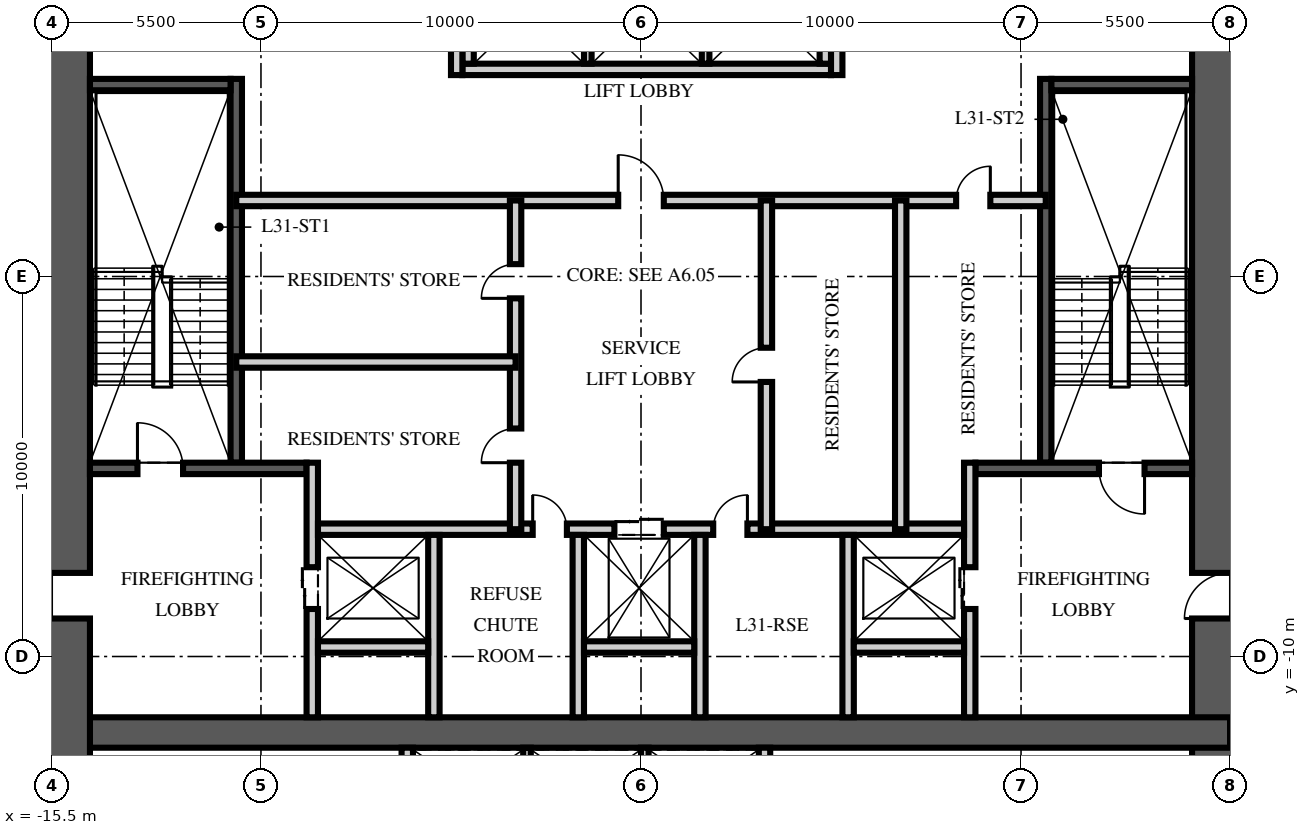
"""IFC4 building model, lengths in metres.
Left out: names, types, materials, properties, quantities, classifications, styles, units other than length and angle.
Written with IfcOpenShell. Run it as: python <this file> out.ifc"""

import sys

from ifc_helpers import new_model, si_unit, direction, frame, frame_2d, origin, place, context, subcontext, project, spatial, rectangle, extrude, element, fill, save


model = new_model("IFC4")
c1 = context("Model", 3, precision=1e-05, world=origin(), true_north=direction((0.0, 1.0)))
c2 = subcontext(c1, "Body", "Model", "MODEL_VIEW")
j1 = project(units=[si_unit("LENGTHUNIT", "METRE"), si_unit("PLANEANGLEUNIT", "RADIAN")], contexts=[c1])
p1 = place(None, origin())
s1 = spatial("IfcSite", under=j1, at=p1, CompositionType="ELEMENT")
p2 = place(p1, origin())
s2 = spatial("IfcBuilding", under=s1, at=p2, CompositionType="ELEMENT")
p3 = place(p2, frame((0.0, 0.0, 126.0)))
s3 = spatial("IfcBuildingStorey", under=s2, at=p3, CompositionType="ELEMENT", Elevation=126.0)
p4 = place(p3, frame((15.5, -15.5, -0.25), z_axis=(0.0, 0.0, 1.0), x_axis=(0.0, 1.0, 0.0)))
e1 = element("IfcWall", 1, at=p4, inside=s3, PredefinedType="SHEAR", context=c2, shape_type="SweptSolid", body=[
    extrude(rectangle(XDim=31.0, YDim=2.0, at=frame_2d((15.5, 0.0))), origin(), (0.0, 0.0, 1.0), 3.75),
])
p5 = place(p4, frame((6.5, 0.0, 0.25)))
e2 = element("IfcOpeningElement", 2, at=p5, cuts=e1, PredefinedType="OPENING", context=c2, shape_type="SweptSolid", body=[
    extrude(rectangle(XDim=1.2, YDim=2.1, at=frame_2d((0.6, 1.05))), frame((0.0, 1.01, 0.0), z_axis=(0.0, -1.0, 0.0), x_axis=(1.0, 0.0, 0.0)), (0.0, 0.0, 1.0), 2.02),
])
p6 = place(p4, frame((23.0, 0.0, 0.25)))
e3 = element("IfcOpeningElement", 3, at=p6, cuts=e1, PredefinedType="OPENING", context=c2, shape_type="SweptSolid", body=[
    extrude(rectangle(XDim=1.8, YDim=2.1, at=frame_2d((0.9, 1.05))), frame((0.0, 1.01, 0.0), z_axis=(0.0, -1.0, 0.0), x_axis=(1.0, 0.0, 0.0)), (0.0, 0.0, 1.0), 2.02),
])
p7 = place(p3, frame((-15.5, -12.0, -0.25), z_axis=(0.0, 0.0, 1.0), x_axis=(1.0, 0.0, 0.0)))
e4 = element("IfcWall", 4, at=p7, inside=s3, PredefinedType="SHEAR", context=c2, shape_type="SweptSolid", body=[
    extrude(rectangle(XDim=31.0, YDim=0.8, at=frame_2d((15.5, 0.0))), origin(), (0.0, 0.0, 1.0), 3.75),
])
p8 = place(p3, frame((-15.5, -15.5, -0.25), z_axis=(0.0, 0.0, 1.0), x_axis=(0.0, 1.0, 0.0)))
e5 = element("IfcWall", 5, at=p8, inside=s3, PredefinedType="SHEAR", context=c2, shape_type="SweptSolid", body=[
    extrude(rectangle(XDim=31.0, YDim=2.0, at=frame_2d((15.5, 0.0))), origin(), (0.0, 0.0, 1.0), 3.75),
])
p9 = place(p8, frame((6.5, 0.0, 0.25)))
e6 = element("IfcOpeningElement", 6, at=p9, cuts=e5, PredefinedType="OPENING", context=c2, shape_type="SweptSolid", body=[
    extrude(rectangle(XDim=1.2, YDim=2.1, at=frame_2d((0.6, 1.05))), frame((0.0, 1.01, 0.0), z_axis=(0.0, -1.0, 0.0), x_axis=(1.0, 0.0, 0.0)), (0.0, 0.0, 1.0), 2.02),
])
p10 = place(p8, frame((23.0, 0.0, 0.25)))
e7 = element("IfcOpeningElement", 7, at=p10, cuts=e5, PredefinedType="OPENING", context=c2, shape_type="SweptSolid", body=[
    extrude(rectangle(XDim=1.8, YDim=2.1, at=frame_2d((0.9, 1.05))), frame((0.0, 1.01, 0.0), z_axis=(0.0, -1.0, 0.0), x_axis=(1.0, 0.0, 0.0)), (0.0, 0.0, 1.0), 2.02),
])
p11 = place(p3, frame((-10.65, -4.9, 0.0), z_axis=(0.0, 0.0, 1.0), x_axis=(0.0, 1.0, 0.0)))
e8 = element("IfcWall", 8, at=p11, inside=s3, PredefinedType="SOLIDWALL", context=c2, shape_type="SweptSolid", body=[
    extrude(rectangle(XDim=10.1, YDim=0.3, at=frame_2d((5.05, 0.0))), origin(), (0.0, 0.0, 1.0), 3.5),
])
p12 = place(p3, frame((-14.5, -5.05, 0.0), z_axis=(0.0, 0.0, 1.0), x_axis=(1.0, 0.0, 0.0)))
e9 = element("IfcWall", 9, at=p12, inside=s3, PredefinedType="SOLIDWALL", context=c2, shape_type="SweptSolid", body=[
    extrude(rectangle(XDim=5.7, YDim=0.3, at=frame_2d((2.85, 0.0))), origin(), (0.0, 0.0, 1.0), 3.5),
])
p13 = place(p12, frame((1.25, 0.0, 0.0)))
e10 = element("IfcOpeningElement", 10, at=p13, cuts=e9, PredefinedType="OPENING", context=c2, shape_type="SweptSolid", body=[
    extrude(rectangle(XDim=1.2, YDim=2.1, at=frame_2d((0.6, 1.05))), frame((0.0, 0.16, 0.0), z_axis=(0.0, -1.0, 0.0), x_axis=(1.0, 0.0, 0.0)), (0.0, 0.0, 1.0), 0.32),
])
p14 = place(p3, frame((-14.5, 5.05, 0.0), z_axis=(0.0, 0.0, 1.0), x_axis=(1.0, 0.0, 0.0)))
e11 = element("IfcWall", 11, at=p14, inside=s3, PredefinedType="SOLIDWALL", context=c2, shape_type="SweptSolid", body=[
    extrude(rectangle(XDim=3.7, YDim=0.3, at=frame_2d((1.85, 0.0))), origin(), (0.0, 0.0, 1.0), 3.5),
])
p15 = place(p3, frame((-8.65, -11.6, 0.0), z_axis=(0.0, 0.0, 1.0), x_axis=(0.0, 1.0, 0.0)))
e12 = element("IfcWall", 12, at=p15, inside=s3, PredefinedType="PARTITIONING", context=c2, shape_type="SweptSolid", body=[
    extrude(rectangle(XDim=6.7, YDim=0.3, at=frame_2d((3.35, 0.0))), origin(), (0.0, 0.0, 1.0), 3.5),
])
p16 = place(p15, frame((2.85, 0.0, 0.0)))
e13 = element("IfcOpeningElement", 13, at=p16, cuts=e12, PredefinedType="OPENING", context=c2, shape_type="SweptSolid", body=[
    extrude(rectangle(XDim=1.1, YDim=2.1, at=frame_2d((0.55, 1.05))), frame((0.0, 0.16, 0.0), z_axis=(0.0, -1.0, 0.0), x_axis=(1.0, 0.0, 0.0)), (0.0, 0.0, 1.0), 0.32),
])
p17 = place(p3, frame((10.65, -4.9, 0.0), z_axis=(0.0, 0.0, 1.0), x_axis=(0.0, 1.0, 0.0)))
e14 = element("IfcWall", 14, at=p17, inside=s3, PredefinedType="SOLIDWALL", context=c2, shape_type="SweptSolid", body=[
    extrude(rectangle(XDim=10.1, YDim=0.3, at=frame_2d((5.05, 0.0))), origin(), (0.0, 0.0, 1.0), 3.5),
])
p18 = place(p3, frame((14.5, -5.05, 0.0), z_axis=(0.0, 0.0, 1.0), x_axis=(-1.0, 0.0, 0.0)))
e15 = element("IfcWall", 15, at=p18, inside=s3, PredefinedType="SOLIDWALL", context=c2, shape_type="SweptSolid", body=[
    extrude(rectangle(XDim=5.7, YDim=0.3, at=frame_2d((2.85, 0.0))), origin(), (0.0, 0.0, 1.0), 3.5),
])
p19 = place(p18, frame((1.25, 0.0, 0.0)))
e16 = element("IfcOpeningElement", 16, at=p19, cuts=e15, PredefinedType="OPENING", context=c2, shape_type="SweptSolid", body=[
    extrude(rectangle(XDim=1.2, YDim=2.1, at=frame_2d((0.6, 1.05))), frame((0.0, 0.16, 0.0), z_axis=(0.0, -1.0, 0.0), x_axis=(1.0, 0.0, 0.0)), (0.0, 0.0, 1.0), 0.32),
])
p20 = place(p3, frame((14.5, 5.05, 0.0), z_axis=(0.0, 0.0, 1.0), x_axis=(-1.0, 0.0, 0.0)))
e17 = element("IfcWall", 17, at=p20, inside=s3, PredefinedType="SOLIDWALL", context=c2, shape_type="SweptSolid", body=[
    extrude(rectangle(XDim=3.7, YDim=0.3, at=frame_2d((1.85, 0.0))), origin(), (0.0, 0.0, 1.0), 3.5),
])
p21 = place(p3, frame((8.65, -11.6, 0.0), z_axis=(0.0, 0.0, 1.0), x_axis=(0.0, 1.0, 0.0)))
e18 = element("IfcWall", 18, at=p21, inside=s3, PredefinedType="PARTITIONING", context=c2, shape_type="SweptSolid", body=[
    extrude(rectangle(XDim=6.7, YDim=0.3, at=frame_2d((3.35, 0.0))), origin(), (0.0, 0.0, 1.0), 3.5),
])
p22 = place(p21, frame((2.85, 0.0, 0.0)))
e19 = element("IfcOpeningElement", 19, at=p22, cuts=e18, PredefinedType="OPENING", context=c2, shape_type="SweptSolid", body=[
    extrude(rectangle(XDim=1.1, YDim=2.1, at=frame_2d((0.55, 1.05))), frame((0.0, 0.16, 0.0), z_axis=(0.0, -1.0, 0.0), x_axis=(1.0, 0.0, 0.0)), (0.0, 0.0, 1.0), 0.32),
])
p23 = place(p3, frame((-8.5, -6.65, 0.0), z_axis=(0.0, 0.0, 1.0), x_axis=(1.0, 0.0, 0.0)))
e20 = element("IfcWall", 20, at=p23, inside=s3, PredefinedType="PARTITIONING", context=c2, shape_type="SweptSolid", body=[
    extrude(rectangle(XDim=17.0, YDim=0.3, at=frame_2d((8.5, 0.0))), origin(), (0.0, 0.0, 1.0), 3.5),
])
p24 = place(p23, frame((7.8, 0.0, 0.0)))
e21 = element("IfcOpeningElement", 21, at=p24, cuts=e20, PredefinedType="OPENING", context=c2, shape_type="SweptSolid", body=[
    extrude(rectangle(XDim=1.3, YDim=2.4, at=frame_2d((0.65, 1.2))), frame((0.0, 0.16, 0.0), z_axis=(0.0, -1.0, 0.0), x_axis=(1.0, 0.0, 0.0)), (0.0, 0.0, 1.0), 0.32),
])
p25 = place(p23, frame((5.65, 0.0, 0.0)))
e22 = element("IfcOpeningElement", 22, at=p25, cuts=e20, PredefinedType="OPENING", context=c2, shape_type="SweptSolid", body=[
    extrude(rectangle(XDim=0.9, YDim=2.1, at=frame_2d((0.45, 1.05))), frame((0.0, 0.16, 0.0), z_axis=(0.0, -1.0, 0.0), x_axis=(1.0, 0.0, 0.0)), (0.0, 0.0, 1.0), 0.32),
])
p26 = place(p23, frame((10.4, 0.0, 0.0)))
e23 = element("IfcOpeningElement", 23, at=p26, cuts=e20, PredefinedType="OPENING", context=c2, shape_type="SweptSolid", body=[
    extrude(rectangle(XDim=0.9, YDim=2.1, at=frame_2d((0.45, 1.05))), frame((0.0, 0.16, 0.0), z_axis=(0.0, -1.0, 0.0), x_axis=(1.0, 0.0, 0.0)), (0.0, 0.0, 1.0), 0.32),
])
for number, where, z_axis, x_axis in (
    (24, (-5.45, -11.6, 0.0), (0.0, 0.0, 1.0), (0.0, 1.0, 0.0)),
    (25, (-1.65, -11.6, 0.0), (0.0, 0.0, 1.0), (0.0, 1.0, 0.0)),
    (26, (1.55, -11.6, 0.0), (0.0, 0.0, 1.0), (0.0, 1.0, 0.0)),
    (27, (5.45, -11.6, 0.0), (0.0, 0.0, 1.0), (0.0, 1.0, 0.0)),
):
    element("IfcWall", number, at=place(p3, frame(where, z_axis=z_axis, x_axis=x_axis)), inside=s3, PredefinedType="PARTITIONING", context=c2, shape_type="SweptSolid", body=[
        extrude(rectangle(XDim=4.8, YDim=0.3, at=frame_2d((2.4, 0.0))), origin(), (0.0, 0.0, 1.0), 3.5),
    ])
for number, where, z_axis, x_axis in (
    (28, (-8.5, -9.75, 0.0), (0.0, 0.0, 1.0), (1.0, 0.0, 0.0)),
    (29, (-1.5, -9.75, 0.0), (0.0, 0.0, 1.0), (1.0, 0.0, 0.0)),
    (30, (5.6, -9.75, 0.0), (0.0, 0.0, 1.0), (1.0, 0.0, 0.0)),
):
    element("IfcWall", number, at=place(p3, frame(where, z_axis=z_axis, x_axis=x_axis)), inside=s3, PredefinedType="PARTITIONING", context=c2, shape_type="SweptSolid", body=[
        extrude(rectangle(XDim=2.9, YDim=0.3, at=frame_2d((1.45, 0.0))), origin(), (0.0, 0.0, 1.0), 3.5),
    ])
p27 = place(p3, frame((-4.7, 5.45, 0.0), z_axis=(0.0, 0.0, 1.0), x_axis=(1.0, 0.0, 0.0)))
e31 = element("IfcWall", 31, at=p27, inside=s3, PredefinedType="PARTITIONING", context=c2, shape_type="SweptSolid", body=[
    extrude(rectangle(XDim=9.7, YDim=0.3, at=frame_2d((4.85, 0.0))), origin(), (0.0, 0.0, 1.0), 3.5),
])
for number, where, z_axis, x_axis in (
    (32, (-4.55, 5.6, 0.0), (0.0, 0.0, 1.0), (0.0, 1.0, 0.0)),
    (33, (4.85, 5.6, 0.0), (0.0, 0.0, 1.0), (0.0, 1.0, 0.0)),
):
    element("IfcWall", number, at=place(p3, frame(where, z_axis=z_axis, x_axis=x_axis)), inside=s3, PredefinedType="PARTITIONING", context=c2, shape_type="SweptSolid", body=[
        extrude(rectangle(XDim=2.8, YDim=0.3, at=frame_2d((1.4, 0.0))), origin(), (0.0, 0.0, 1.0), 3.5),
    ])
for number, where, z_axis, x_axis in (
    (34, (-1.4, 5.6, 0.0), (0.0, 0.0, 1.0), (0.0, 1.0, 0.0)),
    (35, (1.7, 5.6, 0.0), (0.0, 0.0, 1.0), (0.0, 1.0, 0.0)),
):
    element("IfcWall", number, at=place(p3, frame(where, z_axis=z_axis, x_axis=x_axis)), inside=s3, PredefinedType="PARTITIONING", context=c2, shape_type="SweptSolid", body=[
        extrude(rectangle(XDim=2.8, YDim=0.2, at=frame_2d((1.4, 0.0))), origin(), (0.0, 0.0, 1.0), 3.5),
    ])
for number, where, z_axis, x_axis in (
    (36, (-6.15, -14.5, 0.0), (0.0, 0.0, 1.0), (0.0, 1.0, 0.0)),
    (37, (3.25, -14.5, 0.0), (0.0, 0.0, 1.0), (0.0, 1.0, 0.0)),
):
    element("IfcWall", number, at=place(p3, frame(where, z_axis=z_axis, x_axis=x_axis)), inside=s3, PredefinedType="PARTITIONING", context=c2, shape_type="SweptSolid", body=[
        extrude(rectangle(XDim=2.1, YDim=0.3, at=frame_2d((1.05, 0.0))), origin(), (0.0, 0.0, 1.0), 3.5),
    ])
for number, where, z_axis, x_axis in (
    (38, (-3.0, -14.5, 0.0), (0.0, 0.0, 1.0), (0.0, 1.0, 0.0)),
    (39, (0.1, -14.5, 0.0), (0.0, 0.0, 1.0), (0.0, 1.0, 0.0)),
):
    element("IfcWall", number, at=place(p3, frame(where, z_axis=z_axis, x_axis=x_axis)), inside=s3, PredefinedType="PARTITIONING", context=c2, shape_type="SweptSolid", body=[
        extrude(rectangle(XDim=2.1, YDim=0.2, at=frame_2d((1.05, 0.0))), origin(), (0.0, 0.0, 1.0), 3.5),
    ])
p28 = place(p3, frame((-10.65, 2.0, 0.0), z_axis=(0.0, 0.0, 1.0), x_axis=(1.0, 0.0, 0.0)))
e40 = element("IfcWall", 40, at=p28, inside=s3, PredefinedType="PARTITIONING", context=c2, shape_type="SweptSolid", body=[
    extrude(rectangle(XDim=21.3, YDim=0.3, at=frame_2d((10.65, 0.0))), origin(), (0.0, 0.0, 1.0), 3.5),
])
p29 = place(p28, frame((10.05, 0.0, 0.0)))
e41 = element("IfcOpeningElement", 41, at=p29, cuts=e40, PredefinedType="OPENING", context=c2, shape_type="SweptSolid", body=[
    extrude(rectangle(XDim=1.2, YDim=2.1, at=frame_2d((0.6, 1.05))), frame((0.0, 0.16, 0.0), z_axis=(0.0, -1.0, 0.0), x_axis=(1.0, 0.0, 0.0)), (0.0, 0.0, 1.0), 0.32),
])
p30 = place(p28, frame((18.942, 0.0, 0.0)))
e42 = element("IfcOpeningElement", 42, at=p30, cuts=e40, PredefinedType="OPENING", context=c2, shape_type="SweptSolid", body=[
    extrude(rectangle(XDim=0.9, YDim=2.1, at=frame_2d((0.45, 1.05))), frame((0.0, 0.16, 0.0), z_axis=(0.0, -1.0, 0.0), x_axis=(1.0, 0.0, 0.0)), (0.0, 0.0, 1.0), 0.32),
])
p31 = place(p3, frame((-3.3, -6.65, 0.0), z_axis=(0.0, 0.0, 1.0), x_axis=(0.0, 1.0, 0.0)))
e43 = element("IfcWall", 43, at=p31, inside=s3, PredefinedType="PARTITIONING", context=c2, shape_type="SweptSolid", body=[
    extrude(rectangle(XDim=8.65, YDim=0.3, at=frame_2d((4.325, 0.0))), origin(), (0.0, 0.0, 1.0), 3.5),
])
p32 = place(p31, frame((1.75, 0.0, 0.0)))
e44 = element("IfcOpeningElement", 44, at=p32, cuts=e43, PredefinedType="OPENING", context=c2, shape_type="SweptSolid", body=[
    extrude(rectangle(XDim=0.9, YDim=2.1, at=frame_2d((0.45, 1.05))), frame((0.0, 0.16, 0.0), z_axis=(0.0, -1.0, 0.0), x_axis=(1.0, 0.0, 0.0)), (0.0, 0.0, 1.0), 0.32),
])
p33 = place(p31, frame((6.075, 0.0, 0.0)))
e45 = element("IfcOpeningElement", 45, at=p33, cuts=e43, PredefinedType="OPENING", context=c2, shape_type="SweptSolid", body=[
    extrude(rectangle(XDim=0.9, YDim=2.1, at=frame_2d((0.45, 1.05))), frame((0.0, 0.16, 0.0), z_axis=(0.0, -1.0, 0.0), x_axis=(1.0, 0.0, 0.0)), (0.0, 0.0, 1.0), 0.32),
])
p34 = place(p3, frame((3.3, -6.65, 0.0), z_axis=(0.0, 0.0, 1.0), x_axis=(0.0, 1.0, 0.0)))
e46 = element("IfcWall", 46, at=p34, inside=s3, PredefinedType="PARTITIONING", context=c2, shape_type="SweptSolid", body=[
    extrude(rectangle(XDim=8.65, YDim=0.3, at=frame_2d((4.325, 0.0))), origin(), (0.0, 0.0, 1.0), 3.5),
])
p35 = place(p34, frame((3.875, 0.0, 0.0)))
e47 = element("IfcOpeningElement", 47, at=p35, cuts=e46, PredefinedType="OPENING", context=c2, shape_type="SweptSolid", body=[
    extrude(rectangle(XDim=0.9, YDim=2.1, at=frame_2d((0.45, 1.05))), frame((0.0, 0.16, 0.0), z_axis=(0.0, -1.0, 0.0), x_axis=(1.0, 0.0, 0.0)), (0.0, 0.0, 1.0), 0.32),
])
p36 = place(p3, frame((-10.65, -2.25, 0.0), z_axis=(0.0, 0.0, 1.0), x_axis=(1.0, 0.0, 0.0)))
e48 = element("IfcWall", 48, at=p36, inside=s3, PredefinedType="PARTITIONING", context=c2, shape_type="SweptSolid", body=[
    extrude(rectangle(XDim=7.35, YDim=0.3, at=frame_2d((3.675, 0.0))), origin(), (0.0, 0.0, 1.0), 3.5),
])
p37 = place(p3, frame((6.834, -6.65, 0.0), z_axis=(0.0, 0.0, 1.0), x_axis=(0.0, 1.0, 0.0)))
e49 = element("IfcWall", 49, at=p37, inside=s3, PredefinedType="PARTITIONING", context=c2, shape_type="SweptSolid", body=[
    extrude(rectangle(XDim=8.65, YDim=0.3, at=frame_2d((4.325, 0.0))), origin(), (0.0, 0.0, 1.0), 3.5),
])
p38 = place(p3, frame((-4.85, 5.3, 0.0), z_axis=(0.0, 0.0, 1.0), x_axis=(0.0, 1.0, 0.0)))
e50 = element("IfcWall", 50, at=p38, inside=s3, PredefinedType="PARTITIONING", context=c2, shape_type="SweptSolid", body=[
    extrude(rectangle(XDim=6.3, YDim=0.3, at=frame_2d((3.15, 0.0))), origin(), (0.0, 0.0, 1.0), 3.5),
])
p39 = place(p3, frame((5.15, 5.3, 0.0), z_axis=(0.0, 0.0, 1.0), x_axis=(0.0, 1.0, 0.0)))
e51 = element("IfcWall", 51, at=p39, inside=s3, PredefinedType="PARTITIONING", context=c2, shape_type="SweptSolid", body=[
    extrude(rectangle(XDim=6.3, YDim=0.3, at=frame_2d((3.15, 0.0))), origin(), (0.0, 0.0, 1.0), 3.5),
])
p40 = place(p39, frame((4.35, 0.0, 0.0)))
e52 = element("IfcOpeningElement", 52, at=p40, cuts=e51, PredefinedType="OPENING", context=c2, shape_type="SweptSolid", body=[
    extrude(rectangle(XDim=0.9, YDim=2.1, at=frame_2d((0.45, 1.05))), frame((0.0, 0.16, 0.0), z_axis=(0.0, -1.0, 0.0), x_axis=(1.0, 0.0, 0.0)), (0.0, 0.0, 1.0), 0.32),
])
p41 = place(p13, origin())
e53 = element("IfcDoor", 53, at=p41, inside=s3, OperationType="SINGLE_SWING_LEFT", PredefinedType="DOOR", context=c2, shape_type="SweptSolid", body=[
    extrude(rectangle(XDim=1.2, YDim=2.1, at=frame_2d((0.6, 1.05))), frame((0.0, 0.025, 0.0), z_axis=(0.0, -1.0, 0.0), x_axis=(1.0, 0.0, 0.0)), (0.0, 0.0, 1.0), 0.05),
])
fill(e10, e53)
p42 = place(p9, origin())
e54 = element("IfcDoor", 54, at=p42, inside=s3, OperationType="SINGLE_SWING_LEFT", PredefinedType="DOOR", context=c2, shape_type="SweptSolid", body=[
    extrude(rectangle(XDim=1.2, YDim=2.1, at=frame_2d((0.6, 1.05))), frame((0.0, 0.025, 0.0), z_axis=(0.0, -1.0, 0.0), x_axis=(1.0, 0.0, 0.0)), (0.0, 0.0, 1.0), 0.05),
])
fill(e6, e54)
p43 = place(p19, origin())
e55 = element("IfcDoor", 55, at=p43, inside=s3, OperationType="SINGLE_SWING_LEFT", PredefinedType="DOOR", context=c2, shape_type="SweptSolid", body=[
    extrude(rectangle(XDim=1.2, YDim=2.1, at=frame_2d((0.6, 1.05))), frame((0.0, 0.025, 0.0), z_axis=(0.0, -1.0, 0.0), x_axis=(1.0, 0.0, 0.0)), (0.0, 0.0, 1.0), 0.05),
])
fill(e16, e55)
p44 = place(p5, origin())
e56 = element("IfcDoor", 56, at=p44, inside=s3, OperationType="SINGLE_SWING_LEFT", PredefinedType="DOOR", context=c2, shape_type="SweptSolid", body=[
    extrude(rectangle(XDim=1.2, YDim=2.1, at=frame_2d((0.6, 1.05))), frame((0.0, 0.025, 0.0), z_axis=(0.0, -1.0, 0.0), x_axis=(1.0, 0.0, 0.0)), (0.0, 0.0, 1.0), 0.05),
])
fill(e2, e56)
p45 = place(p16, origin())
e57 = element("IfcDoor", 57, at=p45, inside=s3, OperationType="DOUBLE_DOOR_SLIDING", PredefinedType="DOOR", context=c2, shape_type="SweptSolid", body=[
    extrude(rectangle(XDim=1.1, YDim=2.1, at=frame_2d((0.55, 1.05))), frame((0.0, 0.025, 0.0), z_axis=(0.0, -1.0, 0.0), x_axis=(1.0, 0.0, 0.0)), (0.0, 0.0, 1.0), 0.05),
])
fill(e13, e57)
p46 = place(p22, origin())
e58 = element("IfcDoor", 58, at=p46, inside=s3, OperationType="DOUBLE_DOOR_SLIDING", PredefinedType="DOOR", context=c2, shape_type="SweptSolid", body=[
    extrude(rectangle(XDim=1.1, YDim=2.1, at=frame_2d((0.55, 1.05))), frame((0.0, 0.025, 0.0), z_axis=(0.0, -1.0, 0.0), x_axis=(1.0, 0.0, 0.0)), (0.0, 0.0, 1.0), 0.05),
])
fill(e19, e58)
p47 = place(p24, origin())
e59 = element("IfcDoor", 59, at=p47, inside=s3, OperationType="DOUBLE_DOOR_SLIDING", PredefinedType="DOOR", context=c2, shape_type="SweptSolid", body=[
    extrude(rectangle(XDim=1.3, YDim=2.4, at=frame_2d((0.65, 1.2))), frame((0.0, 0.025, 0.0), z_axis=(0.0, -1.0, 0.0), x_axis=(1.0, 0.0, 0.0)), (0.0, 0.0, 1.0), 0.05),
])
fill(e21, e59)
p48 = place(p29, origin())
e60 = element("IfcDoor", 60, at=p48, inside=s3, OperationType="SINGLE_SWING_LEFT", PredefinedType="DOOR", context=c2, shape_type="SweptSolid", body=[
    extrude(rectangle(XDim=1.2, YDim=2.1, at=frame_2d((0.6, 1.05))), frame((0.0, 0.025, 0.0), z_axis=(0.0, -1.0, 0.0), x_axis=(1.0, 0.0, 0.0)), (0.0, 0.0, 1.0), 0.05),
])
fill(e41, e60)
p49 = place(p25, origin())
e61 = element("IfcDoor", 61, at=p49, inside=s3, OperationType="SINGLE_SWING_LEFT", PredefinedType="DOOR", context=c2, shape_type="SweptSolid", body=[
    extrude(rectangle(XDim=0.9, YDim=2.1, at=frame_2d((0.45, 1.05))), frame((0.0, 0.025, 0.0), z_axis=(0.0, -1.0, 0.0), x_axis=(1.0, 0.0, 0.0)), (0.0, 0.0, 1.0), 0.05),
])
fill(e22, e61)
p50 = place(p26, origin())
e62 = element("IfcDoor", 62, at=p50, inside=s3, OperationType="SINGLE_SWING_RIGHT", PredefinedType="DOOR", context=c2, shape_type="SweptSolid", body=[
    extrude(rectangle(XDim=0.9, YDim=2.1, at=frame_2d((0.45, 1.05))), frame((0.0, 0.025, 0.0), z_axis=(0.0, -1.0, 0.0), x_axis=(1.0, 0.0, 0.0)), (0.0, 0.0, 1.0), 0.05),
])
fill(e23, e62)
p51 = place(p32, origin())
e63 = element("IfcDoor", 63, at=p51, inside=s3, OperationType="SINGLE_SWING_LEFT", PredefinedType="DOOR", context=c2, shape_type="SweptSolid", body=[
    extrude(rectangle(XDim=0.9, YDim=2.1, at=frame_2d((0.45, 1.05))), frame((0.0, 0.025, 0.0), z_axis=(0.0, -1.0, 0.0), x_axis=(1.0, 0.0, 0.0)), (0.0, 0.0, 1.0), 0.05),
])
fill(e44, e63)
p52 = place(p33, origin())
e64 = element("IfcDoor", 64, at=p52, inside=s3, OperationType="SINGLE_SWING_LEFT", PredefinedType="DOOR", context=c2, shape_type="SweptSolid", body=[
    extrude(rectangle(XDim=0.9, YDim=2.1, at=frame_2d((0.45, 1.05))), frame((0.0, 0.025, 0.0), z_axis=(0.0, -1.0, 0.0), x_axis=(1.0, 0.0, 0.0)), (0.0, 0.0, 1.0), 0.05),
])
fill(e45, e64)
p53 = place(p35, origin())
e65 = element("IfcDoor", 65, at=p53, inside=s3, OperationType="SINGLE_SWING_LEFT", PredefinedType="DOOR", context=c2, shape_type="SweptSolid", body=[
    extrude(rectangle(XDim=0.9, YDim=2.1, at=frame_2d((0.45, 1.05))), frame((0.0, 0.025, 0.0), z_axis=(0.0, -1.0, 0.0), x_axis=(1.0, 0.0, 0.0)), (0.0, 0.0, 1.0), 0.05),
])
fill(e47, e65)
p54 = place(p30, origin())
e66 = element("IfcDoor", 66, at=p54, inside=s3, OperationType="SINGLE_SWING_RIGHT", PredefinedType="DOOR", context=c2, shape_type="SweptSolid", body=[
    extrude(rectangle(XDim=0.9, YDim=2.1, at=frame_2d((0.45, 1.05))), frame((0.0, 0.025, 0.0), z_axis=(0.0, -1.0, 0.0), x_axis=(1.0, 0.0, 0.0)), (0.0, 0.0, 1.0), 0.05),
])
fill(e42, e66)
save(model, sys.argv[1])
